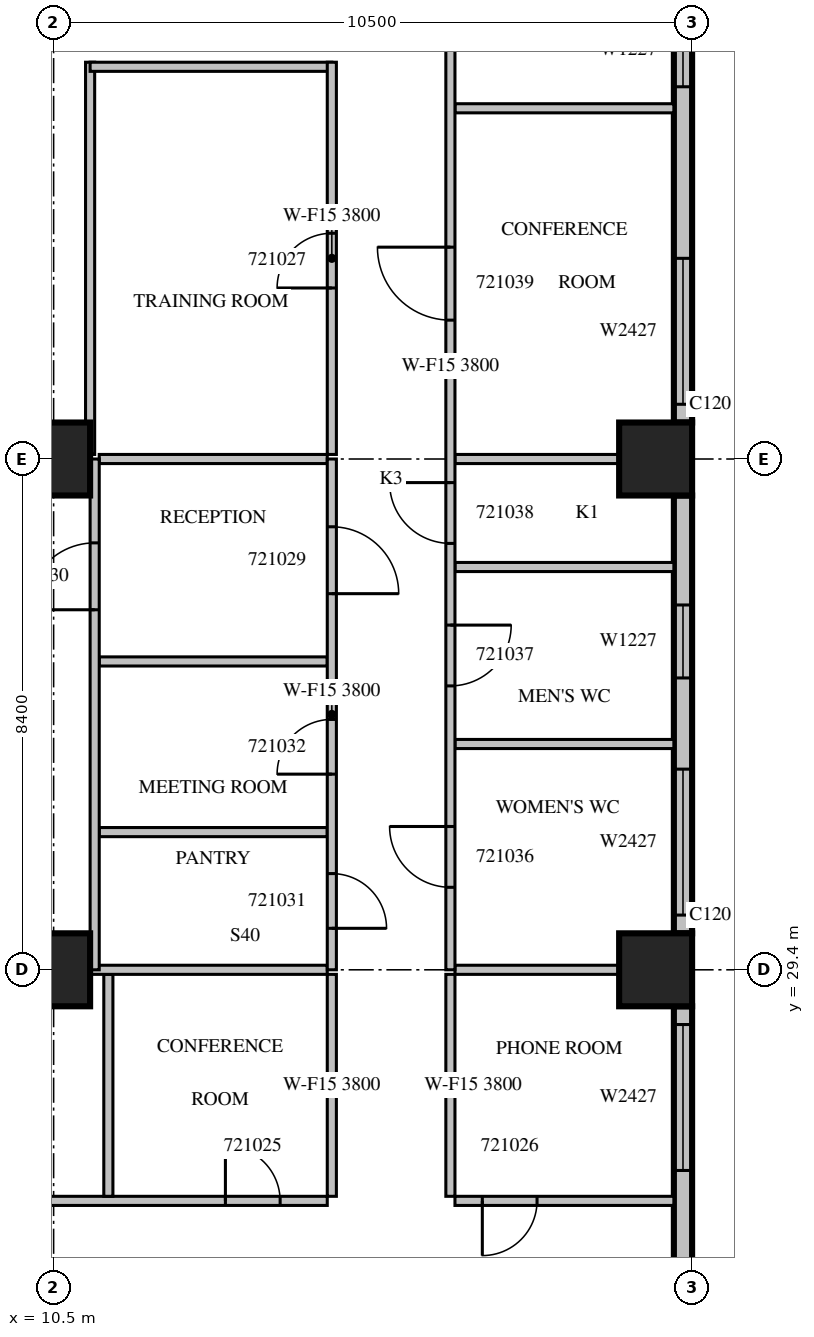
"""IFC4 building model, lengths in metres.
Left out: names, types, materials, properties, quantities, classifications, styles, units other than length and angle.
Written with IfcOpenShell. Run it as: python <this file> out.ifc"""

import sys

from ifc_helpers import new_model, si_unit, direction, frame, frame_2d, origin, origin_2d, place, context, subcontext, project, spatial, rectangle, extrude, source, transform, mapped, element, fill, save


model = new_model("IFC4")
c1 = context("Model", 3, precision=1e-05, world=origin(), true_north=direction((0.0, 1.0)))
c2 = subcontext(c1, "Body", "Model", "MODEL_VIEW")
j1 = project(units=[si_unit("LENGTHUNIT", "METRE"), si_unit("PLANEANGLEUNIT", "RADIAN")], contexts=[c1])
p1 = place(None, origin())
s1 = spatial("IfcSite", under=j1, at=p1, CompositionType="ELEMENT")
p2 = place(p1, origin())
s2 = spatial("IfcBuilding", under=s1, at=p2, CompositionType="ELEMENT")
p3 = place(p2, frame((0.0, 0.0, 99.3)))
s3 = spatial("IfcBuildingStorey", under=s2, at=p3, CompositionType="ELEMENT", Elevation=99.3)
m1 = source(origin(), c2, "Body", "SweptSolid", [
    extrude(rectangle(XDim=1.2, YDim=1.2, at=origin_2d()), origin(), (0.0, 0.0, 1.0), 4.2),
])
for number, where, z_axis, x_axis in (
    (1, (10.5, 29.4, 0.0), (0.0, 0.0, 1.0), (1.0, 0.0, 0.0)),
    (2, (20.4, 29.4, 0.0), (0.0, 0.0, 1.0), (1.0, 0.0, 0.0)),
    (3, (10.5, 37.8, 0.0), (0.0, 0.0, 1.0), (1.0, 0.0, 0.0)),
    (4, (20.4, 37.8, 0.0), (0.0, 0.0, 1.0), (1.0, 0.0, 0.0)),
):
    element("IfcColumn", number, at=place(p3, frame(where, z_axis=z_axis, x_axis=x_axis)), inside=s3, PredefinedType="COLUMN", context=c2, shape_type="MappedRepresentation", body=[
        mapped(m1, transform((0.0, 0.0, 0.0), scale=1.0)),
    ])
m2 = source(origin(), c2, "Body", "SweptSolid", [
    extrude(rectangle(XDim=6.6, YDim=0.3, at=frame_2d((3.3, 0.0))), origin(), (0.0, 0.0, 1.0), 3.8),
])
p4 = place(p3, frame((20.85, 22.2, 0.0), z_axis=(0.0, 0.0, 1.0), x_axis=(0.0, 1.0, 0.0)))
e5 = element("IfcWall", 5, at=p4, inside=s3, PredefinedType="STANDARD", context=c2, shape_type="MappedRepresentation", body=[
    mapped(m2, transform((0.0, 0.0, 0.0), scale=1.0)),
])
m3 = source(origin(), c2, "Body", "SweptSolid", [
    extrude(rectangle(XDim=1.2, YDim=2.7, at=frame_2d((0.6, 1.35))), frame((0.0, 0.16, 0.0), z_axis=(0.0, -1.0, 0.0), x_axis=(1.0, 0.0, 0.0)), (0.0, 0.0, 1.0), 0.32),
])
p5 = place(p4, frame((0.3, 0.0, 0.6)))
e6 = element("IfcOpeningElement", 6, at=p5, cuts=e5, PredefinedType="OPENING", context=c2, shape_type="MappedRepresentation", body=[
    mapped(m3, transform((0.0, 0.0, 0.0), scale=1.0)),
])
m4 = source(origin(), c2, "Body", "SweptSolid", [
    extrude(rectangle(XDim=2.4, YDim=2.7, at=frame_2d((1.2, 1.35))), frame((0.0, 0.16, 0.0), z_axis=(0.0, -1.0, 0.0), x_axis=(1.0, 0.0, 0.0)), (0.0, 0.0, 1.0), 0.32),
])
p6 = place(p4, frame((3.9, 0.0, 0.6)))
e7 = element("IfcOpeningElement", 7, at=p6, cuts=e5, PredefinedType="OPENING", context=c2, shape_type="MappedRepresentation", body=[
    mapped(m4, transform((0.0, 0.0, 0.0), scale=1.0)),
])
m5 = source(origin(), c2, "Body", "SweptSolid", [
    extrude(rectangle(XDim=7.2, YDim=0.3, at=frame_2d((3.6, 0.0))), origin(), (0.0, 0.0, 1.0), 3.8),
])
p7 = place(p3, frame((20.85, 30.0, 0.0), z_axis=(0.0, 0.0, 1.0), x_axis=(0.0, 1.0, 0.0)))
e8 = element("IfcWall", 8, at=p7, inside=s3, PredefinedType="STANDARD", context=c2, shape_type="MappedRepresentation", body=[
    mapped(m5, transform((0.0, 0.0, 0.0), scale=1.0)),
])
p8 = place(p7, frame((0.3, 0.0, 0.6)))
e9 = element("IfcOpeningElement", 9, at=p8, cuts=e8, PredefinedType="OPENING", context=c2, shape_type="MappedRepresentation", body=[
    mapped(m4, transform((0.0, 0.0, 0.0), scale=1.0)),
])
p9 = place(p7, frame((4.199, 0.0, 0.6)))
e10 = element("IfcOpeningElement", 10, at=p9, cuts=e8, PredefinedType="OPENING", context=c2, shape_type="MappedRepresentation", body=[
    mapped(m3, transform((0.0, 0.0, 0.0), scale=1.0)),
])
p10 = place(p3, frame((20.85, 38.4, 0.0), z_axis=(0.0, 0.0, 1.0), x_axis=(0.0, 1.0, 0.0)))
e11 = element("IfcWall", 11, at=p10, inside=s3, PredefinedType="STANDARD", context=c2, shape_type="MappedRepresentation", body=[
    mapped(m5, transform((0.0, 0.0, 0.0), scale=1.0)),
])
p11 = place(p10, frame((0.3, 0.0, 0.6)))
e12 = element("IfcOpeningElement", 12, at=p11, cuts=e11, PredefinedType="OPENING", context=c2, shape_type="MappedRepresentation", body=[
    mapped(m4, transform((0.0, 0.0, 0.0), scale=1.0)),
])
p12 = place(p10, frame((5.521, 0.0, 0.6)))
e13 = element("IfcOpeningElement", 13, at=p12, cuts=e11, PredefinedType="OPENING", context=c2, shape_type="MappedRepresentation", body=[
    mapped(m3, transform((0.0, 0.0, 0.0), scale=1.0)),
])
p13 = place(p3, frame((6.505, 25.6, 0.0), z_axis=(0.0, 0.0, 1.0), x_axis=(1.0, 0.0, 0.0)))
e14 = element("IfcWall", 14, at=p13, inside=s3, PredefinedType="PARTITIONING", context=c2, shape_type="SweptSolid", body=[
    extrude(rectangle(XDim=8.495, YDim=0.15, at=frame_2d((4.247, 0.0))), origin(), (0.0, 0.0, 1.0), 3.8),
])
m6 = source(origin(), c2, "Body", "SweptSolid", [
    extrude(rectangle(XDim=0.9, YDim=2.1, at=frame_2d((0.45, 1.05))), frame((0.0, 0.085, 0.0), z_axis=(0.0, -1.0, 0.0), x_axis=(1.0, 0.0, 0.0)), (0.0, 0.0, 1.0), 0.17),
])
p14 = place(p13, frame((1.745, 0.0, 0.0)))
e15 = element("IfcOpeningElement", 15, at=p14, cuts=e14, PredefinedType="OPENING", context=c2, shape_type="MappedRepresentation", body=[
    mapped(m6, transform((0.0, 0.0, 0.0), scale=1.0)),
])
p15 = place(p13, frame((6.82, 0.0, 0.0)))
e16 = element("IfcOpeningElement", 16, at=p15, cuts=e14, PredefinedType="OPENING", context=c2, shape_type="MappedRepresentation", body=[
    mapped(m6, transform((0.0, 0.0, 0.0), scale=1.0)),
])
m7 = source(origin(), c2, "Body", "SweptSolid", [
    extrude(rectangle(XDim=3.6, YDim=0.15, at=frame_2d((1.8, 0.0))), origin(), (0.0, 0.0, 1.0), 3.8),
])
p16 = place(p3, frame((17.1, 25.6, 0.0), z_axis=(0.0, 0.0, 1.0), x_axis=(1.0, 0.0, 0.0)))
e17 = element("IfcWall", 17, at=p16, inside=s3, PredefinedType="PARTITIONING", context=c2, shape_type="MappedRepresentation", body=[
    mapped(m7, transform((0.0, 0.0, 0.0), scale=1.0)),
])
p17 = place(p16, frame((0.45, 0.0, 0.0)))
e18 = element("IfcOpeningElement", 18, at=p17, cuts=e17, PredefinedType="OPENING", context=c2, shape_type="MappedRepresentation", body=[
    mapped(m6, transform((0.0, 0.0, 0.0), scale=1.0)),
])
m8 = source(origin(), c2, "Body", "SweptSolid", [
    extrude(rectangle(XDim=3.65, YDim=0.15, at=frame_2d((1.825, 0.0))), origin(), (0.0, 0.0, 1.0), 3.8),
])
for number, where, z_axis, x_axis in (
    (19, (11.4, 25.675, 0.0), (0.0, 0.0, 1.0), (0.0, 1.0, 0.0)),
    (20, (15.075, 25.675, 0.0), (0.0, 0.0, 1.0), (0.0, 1.0, 0.0)),
    (21, (17.025, 29.325, 0.0), (0.0, 0.0, 1.0), (0.0, -1.0, 0.0)),
):
    element("IfcWall", number, at=place(p3, frame(where, z_axis=z_axis, x_axis=x_axis)), inside=s3, PredefinedType="PARTITIONING", context=c2, shape_type="MappedRepresentation", body=[
        mapped(m8, transform((0.0, 0.0, 0.0), scale=1.0)),
    ])
m9 = source(origin(), c2, "Body", "SweptSolid", [
    extrude(rectangle(XDim=3.901, YDim=0.15, at=frame_2d((1.95, 0.0))), origin(), (0.0, 0.0, 1.0), 3.8),
])
p18 = place(p3, frame((15.0, 29.4, 0.0), z_axis=(0.0, 0.0, 1.0), x_axis=(-1.0, 0.0, 0.0)))
e22 = element("IfcWall", 22, at=p18, inside=s3, PredefinedType="PARTITIONING", context=c2, shape_type="MappedRepresentation", body=[
    mapped(m9, transform((0.0, 0.0, 0.0), scale=1.0)),
])
m10 = source(origin(), c2, "Body", "SweptSolid", [
    extrude(rectangle(XDim=2.701, YDim=0.15, at=frame_2d((1.351, 0.0))), origin(), (0.0, 0.0, 1.0), 3.8),
])
p19 = place(p3, frame((19.801, 29.4, 0.0), z_axis=(0.0, 0.0, 1.0), x_axis=(-1.0, 0.0, 0.0)))
e23 = element("IfcWall", 23, at=p19, inside=s3, PredefinedType="PARTITIONING", context=c2, shape_type="MappedRepresentation", body=[
    mapped(m10, transform((0.0, 0.0, 0.0), scale=1.0)),
])
m11 = source(origin(), c2, "Body", "SweptSolid", [
    extrude(rectangle(XDim=6.45, YDim=0.15, at=frame_2d((3.225, 0.0))), origin(), (0.0, 0.0, 1.0), 3.8),
])
p20 = place(p3, frame((11.1, 44.325, 0.0), z_axis=(0.0, 0.0, 1.0), x_axis=(0.0, -1.0, 0.0)))
e24 = element("IfcWall", 24, at=p20, inside=s3, PredefinedType="PARTITIONING", context=c2, shape_type="MappedRepresentation", body=[
    mapped(m11, transform((0.0, 0.0, 0.0), scale=1.0)),
])
m12 = source(origin(), c2, "Body", "SweptSolid", [
    extrude(rectangle(XDim=3.975, YDim=0.15, at=frame_2d((1.988, 0.0))), origin(), (0.0, 0.0, 1.0), 3.8),
])
p21 = place(p3, frame((15.075, 44.25, 0.0), z_axis=(0.0, 0.0, 1.0), x_axis=(-1.0, 0.0, 0.0)))
e25 = element("IfcWall", 25, at=p21, inside=s3, PredefinedType="PARTITIONING", context=c2, shape_type="MappedRepresentation", body=[
    mapped(m12, transform((0.0, 0.0, 0.0), scale=1.0)),
])
p22 = place(p3, frame((15.075, 37.875, 0.0), z_axis=(0.0, 0.0, 1.0), x_axis=(0.0, 1.0, 0.0)))
e26 = element("IfcWall", 26, at=p22, inside=s3, PredefinedType="PARTITIONING", context=c2, shape_type="MappedRepresentation", body=[
    mapped(m11, transform((0.0, 0.0, 0.0), scale=1.0)),
])
p23 = place(p22, frame((2.737, 0.0, 0.0)))
e27 = element("IfcOpeningElement", 27, at=p23, cuts=e26, PredefinedType="OPENING", context=c2, shape_type="MappedRepresentation", body=[
    mapped(m6, transform((0.0, 0.0, 0.0), scale=1.0)),
])
m13 = source(origin(), c2, "Body", "SweptSolid", [
    extrude(rectangle(XDim=3.75, YDim=0.15, at=frame_2d((1.875, 0.0))), origin(), (0.0, 0.0, 1.0), 3.8),
])
for number, where, z_axis, x_axis in (
    (28, (15.0, 31.665, 0.0), (0.0, 0.0, 1.0), (-1.0, 0.0, 0.0)),
    (29, (15.0, 34.471, 0.0), (0.0, 0.0, 1.0), (-1.0, 0.0, 0.0)),
    (30, (15.0, 37.8, 0.0), (0.0, 0.0, 1.0), (-1.0, 0.0, 0.0)),
):
    element("IfcWall", number, at=place(p3, frame(where, z_axis=z_axis, x_axis=x_axis)), inside=s3, PredefinedType="PARTITIONING", context=c2, shape_type="MappedRepresentation", body=[
        mapped(m13, transform((0.0, 0.0, 0.0), scale=1.0)),
    ])
m14 = source(origin(), c2, "Body", "SweptSolid", [
    extrude(rectangle(XDim=8.4, YDim=0.15, at=frame_2d((4.2, 0.0))), origin(), (0.0, 0.0, 1.0), 3.8),
])
p24 = place(p3, frame((11.175, 29.4, 0.0), z_axis=(0.0, 0.0, 1.0), x_axis=(0.0, 1.0, 0.0)))
e31 = element("IfcWall", 31, at=p24, inside=s3, PredefinedType="PARTITIONING", context=c2, shape_type="MappedRepresentation", body=[
    mapped(m14, transform((0.0, 0.0, 0.0), scale=1.0)),
])
m15 = source(origin(), c2, "Body", "SweptSolid", [
    extrude(rectangle(XDim=1.1, YDim=2.1, at=frame_2d((0.55, 1.05))), frame((0.0, 0.085, 0.0), z_axis=(0.0, -1.0, 0.0), x_axis=(1.0, 0.0, 0.0)), (0.0, 0.0, 1.0), 0.17),
])
p25 = place(p24, frame((5.921, 0.0, 0.0)))
e32 = element("IfcOpeningElement", 32, at=p25, cuts=e31, PredefinedType="OPENING", context=c2, shape_type="MappedRepresentation", body=[
    mapped(m15, transform((0.0, 0.0, 0.0), scale=1.0)),
])
for number, where, z_axis, x_axis in (
    (33, (17.1, 33.113, 0.0), (0.0, 0.0, 1.0), (1.0, 0.0, 0.0)),
    (34, (17.1, 36.024, 0.0), (0.0, 0.0, 1.0), (1.0, 0.0, 0.0)),
    (35, (17.1, 43.568, 0.0), (0.0, 0.0, 1.0), (1.0, 0.0, 0.0)),
):
    element("IfcWall", number, at=place(p3, frame(where, z_axis=z_axis, x_axis=x_axis)), inside=s3, PredefinedType="PARTITIONING", context=c2, shape_type="MappedRepresentation", body=[
        mapped(m7, transform((0.0, 0.0, 0.0), scale=1.0)),
    ])
p26 = place(p3, frame((19.801, 37.8, 0.0), z_axis=(0.0, 0.0, 1.0), x_axis=(-1.0, 0.0, 0.0)))
e36 = element("IfcWall", 36, at=p26, inside=s3, PredefinedType="PARTITIONING", context=c2, shape_type="MappedRepresentation", body=[
    mapped(m10, transform((0.0, 0.0, 0.0), scale=1.0)),
])
p27 = place(p3, frame((15.075, 29.4, 0.0), z_axis=(0.0, 0.0, 1.0), x_axis=(0.0, 1.0, 0.0)))
e37 = element("IfcWall", 37, at=p27, inside=s3, PredefinedType="PARTITIONING", context=c2, shape_type="MappedRepresentation", body=[
    mapped(m14, transform((0.0, 0.0, 0.0), scale=1.0)),
])
p28 = place(p27, frame((6.185, 0.0, 0.0)))
e38 = element("IfcOpeningElement", 38, at=p28, cuts=e37, PredefinedType="OPENING", context=c2, shape_type="MappedRepresentation", body=[
    mapped(m15, transform((0.0, 0.0, 0.0), scale=1.0)),
])
p29 = place(p27, frame((0.682, 0.0, 0.0)))
e39 = element("IfcOpeningElement", 39, at=p29, cuts=e37, PredefinedType="OPENING", context=c2, shape_type="MappedRepresentation", body=[
    mapped(m6, transform((0.0, 0.0, 0.0), scale=1.0)),
])
p30 = place(p27, frame((3.218, 0.0, 0.0)))
e40 = element("IfcOpeningElement", 40, at=p30, cuts=e37, PredefinedType="OPENING", context=c2, shape_type="MappedRepresentation", body=[
    mapped(m6, transform((0.0, 0.0, 0.0), scale=1.0)),
])
p31 = place(p3, frame((17.025, 49.26, 0.0), z_axis=(0.0, 0.0, 1.0), x_axis=(0.0, -1.0, 0.0)))
e41 = element("IfcWall", 41, at=p31, inside=s3, PredefinedType="PARTITIONING", context=c2, shape_type="SweptSolid", body=[
    extrude(rectangle(XDim=19.86, YDim=0.15, at=frame_2d((9.93, 0.0))), origin(), (0.0, 0.0, 1.0), 3.8),
])
m16 = source(origin(), c2, "Body", "SweptSolid", [
    extrude(rectangle(XDim=1.0, YDim=2.1, at=frame_2d((0.5, 1.05))), frame((0.0, 0.085, 0.0), z_axis=(0.0, -1.0, 0.0), x_axis=(1.0, 0.0, 0.0)), (0.0, 0.0, 1.0), 0.17),
])
p32 = place(p31, frame((17.503, 0.0, 0.0)))
e42 = element("IfcOpeningElement", 42, at=p32, cuts=e41, PredefinedType="OPENING", context=c2, shape_type="MappedRepresentation", body=[
    mapped(m16, transform((0.0, 0.0, 0.0), scale=1.0)),
])
p33 = place(p31, frame((14.191, 0.0, 0.0)))
e43 = element("IfcOpeningElement", 43, at=p33, cuts=e41, PredefinedType="OPENING", context=c2, shape_type="MappedRepresentation", body=[
    mapped(m16, transform((0.0, 0.0, 0.0), scale=1.0)),
])
p34 = place(p31, frame((11.848, 0.0, 0.0)))
e44 = element("IfcOpeningElement", 44, at=p34, cuts=e41, PredefinedType="OPENING", context=c2, shape_type="MappedRepresentation", body=[
    mapped(m16, transform((0.0, 0.0, 0.0), scale=1.0)),
])
m17 = source(origin(), c2, "Body", "SweptSolid", [
    extrude(rectangle(XDim=1.2, YDim=2.1, at=frame_2d((0.6, 1.05))), frame((0.0, 0.085, 0.0), z_axis=(0.0, -1.0, 0.0), x_axis=(1.0, 0.0, 0.0)), (0.0, 0.0, 1.0), 0.17),
])
p35 = place(p31, frame((7.976, 0.0, 0.0)))
e45 = element("IfcOpeningElement", 45, at=p35, cuts=e41, PredefinedType="OPENING", context=c2, shape_type="MappedRepresentation", body=[
    mapped(m17, transform((0.0, 0.0, 0.0), scale=1.0)),
])
p36 = place(p31, frame((2.209, 0.0, 0.0)))
e46 = element("IfcOpeningElement", 46, at=p36, cuts=e41, PredefinedType="OPENING", context=c2, shape_type="MappedRepresentation", body=[
    mapped(m17, transform((0.0, 0.0, 0.0), scale=1.0)),
])
m18 = source(origin(), c2, "Body", "SweptSolid", [
    extrude(rectangle(XDim=2.4, YDim=2.7, at=frame_2d((1.2, 1.35))), frame((0.0, 0.03, 0.0), z_axis=(0.0, -1.0, 0.0), x_axis=(1.0, 0.0, 0.0)), (0.0, 0.0, 1.0), 0.06),
])
p37 = place(p6, origin())
e47 = element("IfcWindow", 47, at=p37, inside=s3, PartitioningType="SINGLE_PANEL", PredefinedType="WINDOW", context=c2, shape_type="MappedRepresentation", body=[
    mapped(m18, transform((0.0, 0.0, 0.0), scale=1.0)),
])
fill(e7, e47)
p38 = place(p8, origin())
e48 = element("IfcWindow", 48, at=p38, inside=s3, PartitioningType="SINGLE_PANEL", PredefinedType="WINDOW", context=c2, shape_type="MappedRepresentation", body=[
    mapped(m18, transform((0.0, 0.0, 0.0), scale=1.0)),
])
fill(e9, e48)
m19 = source(origin(), c2, "Body", "SweptSolid", [
    extrude(rectangle(XDim=1.2, YDim=2.7, at=frame_2d((0.6, 1.35))), frame((0.0, 0.03, 0.0), z_axis=(0.0, -1.0, 0.0), x_axis=(1.0, 0.0, 0.0)), (0.0, 0.0, 1.0), 0.06),
])
p39 = place(p9, origin())
e49 = element("IfcWindow", 49, at=p39, inside=s3, PartitioningType="SINGLE_PANEL", PredefinedType="WINDOW", context=c2, shape_type="MappedRepresentation", body=[
    mapped(m19, transform((0.0, 0.0, 0.0), scale=1.0)),
])
fill(e10, e49)
p40 = place(p11, origin())
e50 = element("IfcWindow", 50, at=p40, inside=s3, PartitioningType="SINGLE_PANEL", PredefinedType="WINDOW", context=c2, shape_type="MappedRepresentation", body=[
    mapped(m18, transform((0.0, 0.0, 0.0), scale=1.0)),
])
fill(e12, e50)
p41 = place(p12, origin())
e51 = element("IfcWindow", 51, at=p41, inside=s3, PartitioningType="SINGLE_PANEL", PredefinedType="WINDOW", context=c2, shape_type="MappedRepresentation", body=[
    mapped(m19, transform((0.0, 0.0, 0.0), scale=1.0)),
])
fill(e13, e51)
m20 = source(origin(), c2, "Body", "SweptSolid", [
    extrude(rectangle(XDim=0.9, YDim=2.1, at=frame_2d((0.45, 1.05))), frame((0.0, 0.025, 0.0), z_axis=(0.0, -1.0, 0.0), x_axis=(1.0, 0.0, 0.0)), (0.0, 0.0, 1.0), 0.05),
])
p42 = place(p15, origin())
e52 = element("IfcDoor", 52, at=p42, inside=s3, OperationType="SINGLE_SWING_LEFT", PredefinedType="DOOR", context=c2, shape_type="MappedRepresentation", body=[
    mapped(m20, transform((0.0, 0.0, 0.0), scale=1.0)),
])
fill(e16, e52)
p43 = place(p17, origin())
e53 = element("IfcDoor", 53, at=p43, inside=s3, OperationType="SINGLE_SWING_RIGHT", PredefinedType="DOOR", context=c2, shape_type="MappedRepresentation", body=[
    mapped(m20, transform((0.0, 0.0, 0.0), scale=1.0)),
])
fill(e18, e53)
p44 = place(p23, origin())
e54 = element("IfcDoor", 54, at=p44, inside=s3, OperationType="SINGLE_SWING_LEFT", PredefinedType="DOOR", context=c2, shape_type="MappedRepresentation", body=[
    mapped(m20, transform((0.0, 0.0, 0.0), scale=1.0)),
])
fill(e27, e54)
m21 = source(origin(), c2, "Body", "SweptSolid", [
    extrude(rectangle(XDim=1.1, YDim=2.1, at=frame_2d((0.55, 1.05))), frame((0.0, 0.025, 0.0), z_axis=(0.0, -1.0, 0.0), x_axis=(1.0, 0.0, 0.0)), (0.0, 0.0, 1.0), 0.05),
])
p45 = place(p28, origin())
e55 = element("IfcDoor", 55, at=p45, inside=s3, OperationType="SINGLE_SWING_RIGHT", PredefinedType="DOOR", context=c2, shape_type="MappedRepresentation", body=[
    mapped(m21, transform((0.0, 0.0, 0.0), scale=1.0)),
])
fill(e38, e55)
p46 = place(p25, origin())
e56 = element("IfcDoor", 56, at=p46, inside=s3, OperationType="SINGLE_SWING_LEFT", PredefinedType="DOOR", context=c2, shape_type="MappedRepresentation", body=[
    mapped(m21, transform((0.0, 0.0, 0.0), scale=1.0)),
])
fill(e32, e56)
p47 = place(p29, origin())
e57 = element("IfcDoor", 57, at=p47, inside=s3, OperationType="SINGLE_SWING_RIGHT", PredefinedType="DOOR", context=c2, shape_type="MappedRepresentation", body=[
    mapped(m20, transform((0.0, 0.0, 0.0), scale=1.0)),
])
fill(e39, e57)
p48 = place(p30, origin())
e58 = element("IfcDoor", 58, at=p48, inside=s3, OperationType="SINGLE_SWING_LEFT", PredefinedType="DOOR", context=c2, shape_type="MappedRepresentation", body=[
    mapped(m20, transform((0.0, 0.0, 0.0), scale=1.0)),
])
fill(e40, e58)
m22 = source(origin(), c2, "Body", "SweptSolid", [
    extrude(rectangle(XDim=1.0, YDim=2.1, at=frame_2d((0.5, 1.05))), frame((0.0, 0.025, 0.0), z_axis=(0.0, -1.0, 0.0), x_axis=(1.0, 0.0, 0.0)), (0.0, 0.0, 1.0), 0.05),
])
p49 = place(p32, origin())
e59 = element("IfcDoor", 59, at=p49, inside=s3, OperationType="SINGLE_SWING_RIGHT", PredefinedType="DOOR", context=c2, shape_type="MappedRepresentation", body=[
    mapped(m22, transform((0.0, 0.0, 0.0), scale=1.0)),
])
fill(e42, e59)
p50 = place(p33, origin())
e60 = element("IfcDoor", 60, at=p50, inside=s3, OperationType="SINGLE_SWING_LEFT", PredefinedType="DOOR", context=c2, shape_type="MappedRepresentation", body=[
    mapped(m22, transform((0.0, 0.0, 0.0), scale=1.0)),
])
fill(e43, e60)
p51 = place(p34, origin())
e61 = element("IfcDoor", 61, at=p51, inside=s3, OperationType="SINGLE_SWING_RIGHT", PredefinedType="DOOR", context=c2, shape_type="MappedRepresentation", body=[
    mapped(m22, transform((0.0, 0.0, 0.0), scale=1.0)),
])
fill(e44, e61)
m23 = source(origin(), c2, "Body", "SweptSolid", [
    extrude(rectangle(XDim=1.2, YDim=2.1, at=frame_2d((0.6, 1.05))), frame((0.0, 0.025, 0.0), z_axis=(0.0, -1.0, 0.0), x_axis=(1.0, 0.0, 0.0)), (0.0, 0.0, 1.0), 0.05),
])
p52 = place(p35, origin())
e62 = element("IfcDoor", 62, at=p52, inside=s3, OperationType="SINGLE_SWING_RIGHT", PredefinedType="DOOR", context=c2, shape_type="MappedRepresentation", body=[
    mapped(m23, transform((0.0, 0.0, 0.0), scale=1.0)),
])
fill(e45, e62)
save(model, sys.argv[1])
